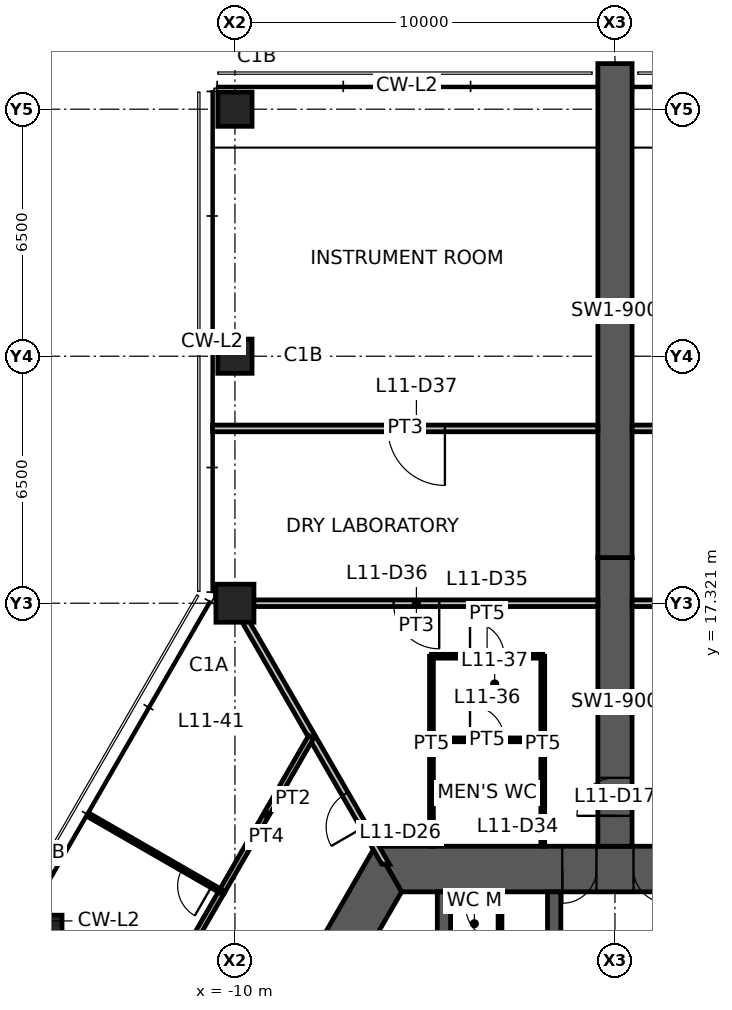
"""IFC4 building model, lengths in metres.
Left out: names, types, materials, properties, quantities, classifications, styles, units other than length and angle.
Written with IfcOpenShell. Run it as: python <this file> out.ifc"""

import sys

from ifc_helpers import new_model, si_unit, direction, frame, frame_2d, origin, origin_2d, place, context, subcontext, project, spatial, polyline, rectangle, hollow_rectangle, outline, extrude, element, fill, save


model = new_model("IFC4")
c1 = context("Model", 3, precision=1e-05, world=origin(), true_north=direction((0.0, 1.0)))
c2 = subcontext(c1, "Body", "Model", "MODEL_VIEW")
j1 = project(units=[si_unit("LENGTHUNIT", "METRE"), si_unit("PLANEANGLEUNIT", "RADIAN")], contexts=[c1])
p1 = place(None, origin())
s1 = spatial("IfcSite", under=j1, at=p1, CompositionType="ELEMENT")
p2 = place(p1, origin())
s2 = spatial("IfcBuilding", under=s1, at=p2, CompositionType="ELEMENT")
p3 = place(p2, frame((0.0, 0.0, 43.6)))
s3 = spatial("IfcBuildingStorey", under=s2, at=p3, CompositionType="ELEMENT", Elevation=43.6)
p4 = place(p3, frame((-10.0, 17.321, 0.0), z_axis=(0.0, 0.0, 1.0), x_axis=(1.0, 0.0, 0.0)))
e1 = element("IfcColumn", 1, at=p4, inside=s3, PredefinedType="COLUMN", context=c2, shape_type="SweptSolid", body=[
    extrude(hollow_rectangle(XDim=1.0, YDim=1.0, WallThickness=0.06, at=origin_2d()), origin(), (0.0, 0.0, 1.0), 4.2),
])
for number, where, z_axis, x_axis in (
    (2, (-15.0, 8.66, 0.0), (0.0, 0.0, 1.0), (1.0, 0.0, 0.0)),
    (3, (-10.0, 23.821, 0.0), (0.0, 0.0, 1.0), (1.0, 0.0, 0.0)),
    (4, (-10.0, 30.321, 0.0), (0.0, 0.0, 1.0), (1.0, 0.0, 0.0)),
):
    element("IfcColumn", number, at=place(p3, frame(where, z_axis=z_axis, x_axis=x_axis)), inside=s3, PredefinedType="COLUMN", context=c2, shape_type="SweptSolid", body=[
        extrude(hollow_rectangle(XDim=0.9, YDim=0.9, WallThickness=0.05, at=origin_2d()), origin(), (0.0, 0.0, 1.0), 4.2),
    ])
p5 = place(p3, frame((5.961, 10.325, 0.0), z_axis=(0.0, 0.0, 1.0), x_axis=(-1.0, 0.0, 0.0)))
e5 = element("IfcWall", 5, at=p5, inside=s3, PredefinedType="SHEAR", context=c2, shape_type="SweptSolid", body=[
    extrude(outline(polyline([(-0.346, -0.6), (4.574, -0.6), (5.474, -0.6), (6.449, -0.6), (7.349, -0.6), (12.269, -0.6), (11.576, 0.6), (7.349, 0.6), (6.449, 0.6), (5.474, 0.6), (4.574, 0.6), (0.346, 0.6), (-0.346, -0.6)])), origin(), (0.0, 0.0, 1.0), 4.2),
])
p6 = place(p5, frame((6.449, 0.0, 0.0)))
e6 = element("IfcOpeningElement", 6, at=p6, cuts=e5, PredefinedType="OPENING", context=c2, shape_type="SweptSolid", body=[
    extrude(rectangle(XDim=0.9, YDim=2.1, at=frame_2d((0.45, 1.05))), frame((0.0, 0.61, 0.0), z_axis=(0.0, -1.0, 0.0), x_axis=(1.0, 0.0, 0.0)), (0.0, 0.0, 1.0), 1.22),
])
p7 = place(p5, frame((4.574, 0.0, 0.0)))
e7 = element("IfcOpeningElement", 7, at=p7, cuts=e5, PredefinedType="OPENING", context=c2, shape_type="SweptSolid", body=[
    extrude(rectangle(XDim=0.9, YDim=2.1, at=frame_2d((0.45, 1.05))), frame((0.0, 0.61, 0.0), z_axis=(0.0, -1.0, 0.0), x_axis=(1.0, 0.0, 0.0)), (0.0, 0.0, 1.0), 1.22),
])
p8 = place(p3, frame((-5.961, 10.325, 0.0), z_axis=(0.0, 0.0, 1.0), x_axis=(-0.500004296715, -0.866022923061, 0.0)))
e8 = element("IfcWall", 8, at=p8, inside=s3, PredefinedType="SHEAR", context=c2, shape_type="SweptSolid", body=[
    extrude(outline(polyline([(-0.346, -0.6), (4.494, -0.6), (5.494, -0.6), (12.269, -0.6), (11.576, 0.6), (5.494, 0.6), (4.494, 0.6), (0.346, 0.6), (-0.346, -0.6)])), origin(), (0.0, 0.0, 1.0), 4.2),
])
p9 = place(p8, frame((4.494, 0.0, 0.0)))
e9 = element("IfcOpeningElement", 9, at=p9, cuts=e8, PredefinedType="OPENING", context=c2, shape_type="SweptSolid", body=[
    extrude(rectangle(XDim=1.0, YDim=2.1, at=frame_2d((0.5, 1.05))), frame((0.0, 0.61, 0.0), z_axis=(0.0, -1.0, 0.0), x_axis=(1.0, 0.0, 0.0)), (0.0, 0.0, 1.0), 1.22),
])
p10 = place(p3, frame((0.0, 10.925, 0.0), z_axis=(0.0, 0.0, 1.0), x_axis=(0.0, 1.0, 0.0)))
e10 = element("IfcWall", 10, at=p10, inside=s3, PredefinedType="SHEAR", context=c2, shape_type="SweptSolid", body=[
    extrude(rectangle(XDim=7.595, YDim=0.9, at=frame_2d((3.798, 0.0))), origin(), (0.0, 0.0, 1.0), 4.2),
])
p11 = place(p10, frame((0.8, 0.0, 0.0)))
e11 = element("IfcOpeningElement", 11, at=p11, cuts=e10, PredefinedType="OPENING", context=c2, shape_type="SweptSolid", body=[
    extrude(rectangle(XDim=1.0, YDim=2.1, at=frame_2d((0.5, 1.05))), frame((0.0, 0.46, 0.0), z_axis=(0.0, -1.0, 0.0), x_axis=(1.0, 0.0, 0.0)), (0.0, 0.0, 1.0), 0.92),
])
p12 = place(p3, frame((0.0, 18.521, 0.0), z_axis=(0.0, 0.0, 1.0), x_axis=(0.0, 1.0, 0.0)))
e12 = element("IfcWall", 12, at=p12, inside=s3, PredefinedType="SHEAR", context=c2, shape_type="SweptSolid", body=[
    extrude(rectangle(XDim=13.0, YDim=0.9, at=frame_2d((6.5, 0.0))), origin(), (0.0, 0.0, 1.0), 4.2),
])
p13 = place(p3, frame((-1.6, 3.775, 0.0), z_axis=(0.0, 0.0, 1.0), x_axis=(0.0, 1.0, 0.0)))
e13 = element("IfcWall", 13, at=p13, inside=s3, PredefinedType="SHEAR", context=c2, shape_type="SweptSolid", body=[
    extrude(rectangle(XDim=5.95, YDim=0.35, at=frame_2d((2.975, 0.0))), origin(), (0.0, 0.0, 1.0), 4.2),
])
p14 = place(p13, frame((3.775, 0.0, 0.0)))
e14 = element("IfcOpeningElement", 14, at=p14, cuts=e13, PredefinedType="OPENING", context=c2, shape_type="SweptSolid", body=[
    extrude(rectangle(XDim=0.9, YDim=2.1, at=frame_2d((0.45, 1.05))), frame((0.0, 0.185, 0.0), z_axis=(0.0, -1.0, 0.0), x_axis=(1.0, 0.0, 0.0)), (0.0, 0.0, 1.0), 0.37),
])
p15 = place(p3, frame((-4.5, 3.775, 0.0), z_axis=(0.0, 0.0, 1.0), x_axis=(0.0, 1.0, 0.0)))
e15 = element("IfcWall", 15, at=p15, inside=s3, PredefinedType="SHEAR", context=c2, shape_type="SweptSolid", body=[
    extrude(rectangle(XDim=5.95, YDim=0.35, at=frame_2d((2.975, 0.0))), origin(), (0.0, 0.0, 1.0), 4.2),
])
p16 = place(p3, frame((-3.025, 6.575, 0.0), z_axis=(0.0, 0.0, 1.0), x_axis=(0.0, 1.0, 0.0)))
e16 = element("IfcWall", 16, at=p16, inside=s3, PredefinedType="PARTITIONING", context=c2, shape_type="SweptSolid", body=[
    extrude(rectangle(XDim=3.15, YDim=0.1, at=frame_2d((1.575, 0.0))), origin(), (0.0, 0.0, 1.0), 3.23),
])
p17 = place(p16, frame((1.863, 0.0, 0.0)))
e17 = element("IfcOpeningElement", 17, at=p17, cuts=e16, PredefinedType="OPENING", context=c2, shape_type="SweptSolid", body=[
    extrude(rectangle(XDim=0.9, YDim=2.1, at=frame_2d((0.45, 1.05))), frame((0.0, 0.06, 0.0), z_axis=(0.0, -1.0, 0.0), x_axis=(1.0, 0.0, 0.0)), (0.0, 0.0, 1.0), 0.12),
])
p18 = place(p16, frame((0.363, 0.0, 0.0)))
e18 = element("IfcOpeningElement", 18, at=p18, cuts=e16, PredefinedType="OPENING", context=c2, shape_type="SweptSolid", body=[
    extrude(rectangle(XDim=0.9, YDim=2.1, at=frame_2d((0.45, 1.05))), frame((0.0, 0.06, 0.0), z_axis=(0.0, -1.0, 0.0), x_axis=(1.0, 0.0, 0.0)), (0.0, 0.0, 1.0), 0.12),
])
p19 = place(p3, frame((-6.035, 10.453, 0.0), z_axis=(0.0, 0.0, 1.0), x_axis=(-0.499993402427, 0.866029212861, 0.0)))
e19 = element("IfcWall", 19, at=p19, inside=s3, PredefinedType="PARTITIONING", context=c2, shape_type="SweptSolid", body=[
    extrude(outline(polyline([(-0.051, -0.087), (1.129, -0.087), (2.129, -0.087), (7.93, -0.087), (7.93, 0.087), (2.129, 0.087), (1.129, 0.087), (0.051, 0.087), (-0.051, -0.087)])), origin(), (0.0, 0.0, 1.0), 3.33),
])
p20 = place(p19, frame((1.129, 0.0, 0.0)))
e20 = element("IfcOpeningElement", 20, at=p20, cuts=e19, PredefinedType="OPENING", context=c2, shape_type="SweptSolid", body=[
    extrude(rectangle(XDim=1.0, YDim=2.1, at=frame_2d((0.5, 1.05))), frame((0.0, 0.098, 0.0), z_axis=(0.0, -1.0, 0.0), x_axis=(1.0, 0.0, 0.0)), (0.0, 0.0, 1.0), 0.195),
])
p21 = place(p3, frame((0.45, 17.321, 0.0), z_axis=(0.0, 0.0, 1.0), x_axis=(1.0, 0.0, 0.0)))
e21 = element("IfcWall", 21, at=p21, inside=s3, PredefinedType="PARTITIONING", context=c2, shape_type="SweptSolid", body=[
    extrude(rectangle(XDim=9.55, YDim=0.175, at=frame_2d((4.775, 0.0))), origin(), (0.0, 0.0, 1.0), 3.238),
])
p22 = place(p21, frame((4.175, 0.0, 0.0)))
e22 = element("IfcOpeningElement", 22, at=p22, cuts=e21, PredefinedType="OPENING", context=c2, shape_type="SweptSolid", body=[
    extrude(rectangle(XDim=1.2, YDim=2.1, at=frame_2d((0.6, 1.05))), frame((0.0, 0.098, 0.0), z_axis=(0.0, -1.0, 0.0), x_axis=(1.0, 0.0, 0.0)), (0.0, 0.0, 1.0), 0.195),
])
p23 = place(p3, frame((0.45, 21.92, 0.0), z_axis=(0.0, 0.0, 1.0), x_axis=(1.0, 0.0, 0.0)))
e23 = element("IfcWall", 23, at=p23, inside=s3, PredefinedType="PARTITIONING", context=c2, shape_type="SweptSolid", body=[
    extrude(rectangle(XDim=10.14, YDim=0.175, at=frame_2d((5.07, 0.0))), origin(), (0.0, 0.0, 1.0), 4.03),
])
p24 = place(p23, frame((4.025, 0.0, 0.0)))
e24 = element("IfcOpeningElement", 24, at=p24, cuts=e23, PredefinedType="OPENING", context=c2, shape_type="SweptSolid", body=[
    extrude(rectangle(XDim=1.5, YDim=2.1, at=frame_2d((0.75, 1.05))), frame((0.0, 0.098, 0.0), z_axis=(0.0, -1.0, 0.0), x_axis=(1.0, 0.0, 0.0)), (0.0, 0.0, 1.0), 0.195),
])
p25 = place(p3, frame((-4.829, 13.725, 0.0), z_axis=(0.0, 0.0, 1.0), x_axis=(1.0, 0.0, 0.0)))
e25 = element("IfcWall", 25, at=p25, inside=s3, PredefinedType="PARTITIONING", context=c2, shape_type="SweptSolid", body=[
    extrude(rectangle(XDim=2.929, YDim=0.1, at=frame_2d((1.464, 0.0))), origin(), (0.0, 0.0, 1.0), 3.23),
])
p26 = place(p25, frame((1.014, 0.0, 0.0)))
e26 = element("IfcOpeningElement", 26, at=p26, cuts=e25, PredefinedType="OPENING", context=c2, shape_type="SweptSolid", body=[
    extrude(rectangle(XDim=0.9, YDim=2.1, at=frame_2d((0.45, 1.05))), frame((0.0, 0.06, 0.0), z_axis=(0.0, -1.0, 0.0), x_axis=(1.0, 0.0, 0.0)), (0.0, 0.0, 1.0), 0.12),
])
p27 = place(p3, frame((-4.829, 15.925, 0.0), z_axis=(0.0, 0.0, 1.0), x_axis=(1.0, 0.0, 0.0)))
e27 = element("IfcWall", 27, at=p27, inside=s3, PredefinedType="PARTITIONING", context=c2, shape_type="SweptSolid", body=[
    extrude(rectangle(XDim=2.929, YDim=0.1, at=frame_2d((1.464, 0.0))), origin(), (0.0, 0.0, 1.0), 3.23),
])
p28 = place(p27, frame((1.014, 0.0, 0.0)))
e28 = element("IfcOpeningElement", 28, at=p28, cuts=e27, PredefinedType="OPENING", context=c2, shape_type="SweptSolid", body=[
    extrude(rectangle(XDim=0.9, YDim=2.1, at=frame_2d((0.45, 1.05))), frame((0.0, 0.06, 0.0), z_axis=(0.0, -1.0, 0.0), x_axis=(1.0, 0.0, 0.0)), (0.0, 0.0, 1.0), 0.12),
])
for number, where, z_axis, x_axis in (
    (29, (-1.9, 10.925, 0.0), (0.0, 0.0, 1.0), (0.0, 1.0, 0.0)),
    (30, (-4.829, 10.925, 0.0), (0.0, 0.0, 1.0), (0.0, 1.0, 0.0)),
):
    element("IfcWall", number, at=place(p3, frame(where, z_axis=z_axis, x_axis=x_axis)), inside=s3, PredefinedType="PARTITIONING", context=c2, shape_type="SweptSolid", body=[
        extrude(rectangle(XDim=5.0, YDim=0.1, at=frame_2d((2.5, 0.0))), origin(), (0.0, 0.0, 1.0), 3.23),
    ])
p29 = place(p3, frame((-0.45, 17.321, 0.0), z_axis=(0.0, 0.0, 1.0), x_axis=(-1.0, 0.0, 0.0)))
e31 = element("IfcWall", 31, at=p29, inside=s3, PredefinedType="PARTITIONING", context=c2, shape_type="SweptSolid", body=[
    extrude(rectangle(XDim=9.55, YDim=0.175, at=frame_2d((4.775, 0.0))), origin(), (0.0, 0.0, 1.0), 3.238),
])
p30 = place(p29, frame((4.175, 0.0, 0.0)))
e32 = element("IfcOpeningElement", 32, at=p30, cuts=e31, PredefinedType="OPENING", context=c2, shape_type="SweptSolid", body=[
    extrude(rectangle(XDim=1.2, YDim=2.1, at=frame_2d((0.6, 1.05))), frame((0.0, 0.098, 0.0), z_axis=(0.0, -1.0, 0.0), x_axis=(1.0, 0.0, 0.0)), (0.0, 0.0, 1.0), 0.195),
])
p31 = place(p3, frame((-0.45, 21.92, 0.0), z_axis=(0.0, 0.0, 1.0), x_axis=(-1.0, 0.0, 0.0)))
e33 = element("IfcWall", 33, at=p31, inside=s3, PredefinedType="PARTITIONING", context=c2, shape_type="SweptSolid", body=[
    extrude(rectangle(XDim=10.14, YDim=0.175, at=frame_2d((5.07, 0.0))), origin(), (0.0, 0.0, 1.0), 4.03),
])
p32 = place(p31, frame((4.025, 0.0, 0.0)))
e34 = element("IfcOpeningElement", 34, at=p32, cuts=e33, PredefinedType="OPENING", context=c2, shape_type="SweptSolid", body=[
    extrude(rectangle(XDim=1.5, YDim=2.1, at=frame_2d((0.75, 1.05))), frame((0.0, 0.098, 0.0), z_axis=(0.0, -1.0, 0.0), x_axis=(1.0, 0.0, 0.0)), (0.0, 0.0, 1.0), 0.195),
])
p33 = place(p3, frame((-10.352, 9.719, 0.0), z_axis=(0.0, 0.0, 1.0), x_axis=(0.499985273446, 0.866033905998, 0.0)))
e35 = element("IfcWall", 35, at=p33, inside=s3, PredefinedType="PARTITIONING", context=c2, shape_type="SweptSolid", body=[
    extrude(rectangle(XDim=4.718, YDim=0.15, at=frame_2d((2.359, 0.0))), origin(), (0.0, 0.0, 1.0), 3.23),
])
p34 = place(p3, frame((-13.598, 4.097, 0.0), z_axis=(0.0, 0.0, 1.0), x_axis=(0.49998791073, 0.866032383415, 0.0)))
e36 = element("IfcWall", 36, at=p34, inside=s3, PredefinedType="PARTITIONING", context=c2, shape_type="SweptSolid", body=[
    extrude(rectangle(XDim=6.502, YDim=0.15, at=frame_2d((3.251, 0.0))), origin(), (0.0, 0.0, 1.0), 3.23),
])
p35 = place(p34, frame((2.751, 0.0, 0.0)))
e37 = element("IfcOpeningElement", 37, at=p35, cuts=e36, PredefinedType="OPENING", context=c2, shape_type="SweptSolid", body=[
    extrude(rectangle(XDim=1.0, YDim=2.1, at=frame_2d((0.5, 1.05))), frame((0.0, 0.085, 0.0), z_axis=(0.0, -1.0, 0.0), x_axis=(1.0, 0.0, 0.0)), (0.0, 0.0, 1.0), 0.17),
])
p36 = place(p3, frame((-10.347, 9.728, 0.0), z_axis=(0.0, 0.0, 1.0), x_axis=(-0.866583023507, 0.499032928142, 0.0)))
e38 = element("IfcWall", 38, at=p36, inside=s3, PredefinedType="PARTITIONING", context=c2, shape_type="SweptSolid", body=[
    extrude(rectangle(XDim=3.975, YDim=0.1, at=frame_2d((1.988, 0.0))), origin(), (0.0, 0.0, 1.0), 3.23),
])
p37 = place(p36, frame((0.3, 0.0, 0.0)))
e39 = element("IfcOpeningElement", 39, at=p37, cuts=e38, PredefinedType="OPENING", context=c2, shape_type="SweptSolid", body=[
    extrude(rectangle(XDim=0.9, YDim=2.1, at=frame_2d((0.45, 1.05))), frame((0.0, 0.06, 0.0), z_axis=(0.0, -1.0, 0.0), x_axis=(1.0, 0.0, 0.0)), (0.0, 0.0, 1.0), 0.12),
])
p38 = place(p6, origin())
e40 = element("IfcDoor", 40, at=p38, inside=s3, OperationType="SINGLE_SWING_RIGHT", PredefinedType="DOOR", context=c2, shape_type="SweptSolid", body=[
    extrude(rectangle(XDim=0.9, YDim=2.1, at=frame_2d((0.45, 1.05))), frame((0.0, 0.025, 0.0), z_axis=(0.0, -1.0, 0.0), x_axis=(1.0, 0.0, 0.0)), (0.0, 0.0, 1.0), 0.05),
])
fill(e6, e40)
p39 = place(p7, origin())
e41 = element("IfcDoor", 41, at=p39, inside=s3, OperationType="SINGLE_SWING_LEFT", PredefinedType="DOOR", context=c2, shape_type="SweptSolid", body=[
    extrude(rectangle(XDim=0.9, YDim=2.1, at=frame_2d((0.45, 1.05))), frame((0.0, 0.025, 0.0), z_axis=(0.0, -1.0, 0.0), x_axis=(1.0, 0.0, 0.0)), (0.0, 0.0, 1.0), 0.05),
])
fill(e7, e41)
p40 = place(p11, origin())
e42 = element("IfcDoor", 42, at=p40, inside=s3, OperationType="SINGLE_SWING_LEFT", PredefinedType="DOOR", context=c2, shape_type="SweptSolid", body=[
    extrude(rectangle(XDim=1.0, YDim=2.1, at=frame_2d((0.5, 1.05))), frame((0.0, 0.025, 0.0), z_axis=(0.0, -1.0, 0.0), x_axis=(1.0, 0.0, 0.0)), (0.0, 0.0, 1.0), 0.05),
])
fill(e11, e42)
p41 = place(p17, origin())
e43 = element("IfcDoor", 43, at=p41, inside=s3, OperationType="SINGLE_SWING_RIGHT", PredefinedType="DOOR", context=c2, shape_type="SweptSolid", body=[
    extrude(rectangle(XDim=0.9, YDim=2.1, at=frame_2d((0.45, 1.05))), frame((0.0, 0.025, 0.0), z_axis=(0.0, -1.0, 0.0), x_axis=(1.0, 0.0, 0.0)), (0.0, 0.0, 1.0), 0.05),
])
fill(e17, e43)
p42 = place(p20, origin())
e44 = element("IfcDoor", 44, at=p42, inside=s3, OperationType="SINGLE_SWING_LEFT", PredefinedType="DOOR", context=c2, shape_type="SweptSolid", body=[
    extrude(rectangle(XDim=1.0, YDim=2.1, at=frame_2d((0.5, 1.05))), frame((0.0, 0.025, 0.0), z_axis=(0.0, -1.0, 0.0), x_axis=(1.0, 0.0, 0.0)), (0.0, 0.0, 1.0), 0.05),
])
fill(e20, e44)
p43 = place(p26, origin())
e45 = element("IfcDoor", 45, at=p43, inside=s3, OperationType="SINGLE_SWING_LEFT", PredefinedType="DOOR", context=c2, shape_type="SweptSolid", body=[
    extrude(rectangle(XDim=0.9, YDim=2.1, at=frame_2d((0.45, 1.05))), frame((0.0, 0.025, 0.0), z_axis=(0.0, -1.0, 0.0), x_axis=(1.0, 0.0, 0.0)), (0.0, 0.0, 1.0), 0.05),
])
fill(e26, e45)
p44 = place(p28, origin())
e46 = element("IfcDoor", 46, at=p44, inside=s3, OperationType="SINGLE_SWING_LEFT", PredefinedType="DOOR", context=c2, shape_type="SweptSolid", body=[
    extrude(rectangle(XDim=0.9, YDim=2.1, at=frame_2d((0.45, 1.05))), frame((0.0, 0.025, 0.0), z_axis=(0.0, -1.0, 0.0), x_axis=(1.0, 0.0, 0.0)), (0.0, 0.0, 1.0), 0.05),
])
fill(e28, e46)
p45 = place(p30, origin())
e47 = element("IfcDoor", 47, at=p45, inside=s3, OperationType="DOUBLE_DOOR_SINGLE_SWING", PredefinedType="DOOR", context=c2, shape_type="SweptSolid", body=[
    extrude(rectangle(XDim=1.2, YDim=2.1, at=frame_2d((0.6, 1.05))), frame((0.0, 0.025, 0.0), z_axis=(0.0, -1.0, 0.0), x_axis=(1.0, 0.0, 0.0)), (0.0, 0.0, 1.0), 0.05),
])
fill(e32, e47)
p46 = place(p32, origin())
e48 = element("IfcDoor", 48, at=p46, inside=s3, OperationType="DOUBLE_DOOR_SINGLE_SWING", PredefinedType="DOOR", context=c2, shape_type="SweptSolid", body=[
    extrude(rectangle(XDim=1.5, YDim=2.1, at=frame_2d((0.75, 1.05))), frame((0.0, 0.025, 0.0), z_axis=(0.0, -1.0, 0.0), x_axis=(1.0, 0.0, 0.0)), (0.0, 0.0, 1.0), 0.05),
])
fill(e34, e48)
p47 = place(p37, origin())
e49 = element("IfcDoor", 49, at=p47, inside=s3, OperationType="SINGLE_SWING_LEFT", PredefinedType="DOOR", context=c2, shape_type="SweptSolid", body=[
    extrude(rectangle(XDim=0.9, YDim=2.1, at=frame_2d((0.45, 1.05))), frame((0.0, 0.025, 0.0), z_axis=(0.0, -1.0, 0.0), x_axis=(1.0, 0.0, 0.0)), (0.0, 0.0, 1.0), 0.05),
])
fill(e39, e49)
save(model, sys.argv[1])
